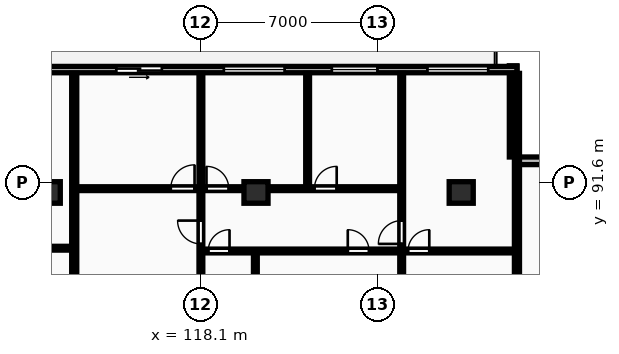
"""IFC4 building model, lengths in metres.
Left out: names, types, materials, properties, quantities, classifications, styles, units other than length and angle.
Written with IfcOpenShell. Run it as: python <this file> out.ifc"""

import sys

from ifc_helpers import new_model, si_unit, direction, frame, frame_2d, origin, origin_2d, place, context, subcontext, project, spatial, rectangle, extrude, element, fill, save


model = new_model("IFC4")
c1 = context("Model", 3, precision=1e-05, world=origin(), true_north=direction((0.0, 1.0)))
c2 = subcontext(c1, "Body", "Model", "MODEL_VIEW")
j1 = project(units=[si_unit("LENGTHUNIT", "METRE"), si_unit("PLANEANGLEUNIT", "RADIAN")], contexts=[c1])
p1 = place(None, origin())
s1 = spatial("IfcSite", under=j1, at=p1, CompositionType="ELEMENT")
p2 = place(p1, origin())
s2 = spatial("IfcBuilding", under=s1, at=p2, CompositionType="ELEMENT")
p3 = place(p2, frame((0.0, 0.0, 126.3)))
s3 = spatial("IfcBuildingStorey", under=s2, at=p3, CompositionType="ELEMENT", Elevation=126.3)
for number, where, z_axis, x_axis in (
    (1, (112.1, 91.2, 0.0), (0.0, 0.0, 1.0), (1.0, 0.0, 0.0)),
    (2, (120.3, 91.2, 0.0), (0.0, 0.0, 1.0), (1.0, 0.0, 0.0)),
    (3, (128.4, 91.2, 0.0), (0.0, 0.0, 1.0), (1.0, 0.0, 0.0)),
):
    element("IfcColumn", number, at=place(p3, frame(where, z_axis=z_axis, x_axis=x_axis)), inside=s3, PredefinedType="COLUMN", context=c2, shape_type="SweptSolid", body=[
        extrude(rectangle(XDim=0.95, YDim=0.85, at=origin_2d()), origin(), (0.0, 0.0, 1.0), 3.25),
    ])
for number, where, z_axis, x_axis in (
    (4, (134.2, 92.45, 0.0), (0.0, 0.0, 1.0), (-1.0, 0.0, 0.0)),
    (5, (130.45, 92.6, 0.0), (0.0, 0.0, 1.0), (0.0, 1.0, 0.0)),
):
    element("IfcWall", number, at=place(p3, frame(where, z_axis=z_axis, x_axis=x_axis)), inside=s3, PredefinedType="STANDARD", context=c2, shape_type="SweptSolid", body=[
        extrude(rectangle(XDim=3.6, YDim=0.3, at=frame_2d((1.8, 0.0))), origin(), (0.0, 0.0, 1.0), 2.97),
    ])
p4 = place(p3, frame((130.6, 96.05, 0.0), z_axis=(0.0, 0.0, 1.0), x_axis=(-1.0, 0.0, 0.0)))
e6 = element("IfcWall", 6, at=p4, inside=s3, PredefinedType="STANDARD", context=c2, shape_type="SweptSolid", body=[
    extrude(rectangle(XDim=73.0, YDim=0.25, at=frame_2d((36.5, 0.0))), origin(), (0.0, 0.0, 1.0), 2.97),
])
p5 = place(p4, frame((68.591, 0.0, 0.0)))
e7 = element("IfcOpeningElement", 7, at=p5, cuts=e6, PredefinedType="OPENING", context=c2, shape_type="SweptSolid", body=[
    extrude(rectangle(XDim=1.8, YDim=2.2, at=frame_2d((0.9, 1.1))), frame((0.0, 0.135, 0.0), z_axis=(0.0, -1.0, 0.0), x_axis=(1.0, 0.0, 0.0)), (0.0, 0.0, 1.0), 0.27),
])
p6 = place(p4, frame((60.092, 0.0, 0.85)))
e8 = element("IfcOpeningElement", 8, at=p6, cuts=e6, PredefinedType="OPENING", context=c2, shape_type="SweptSolid", body=[
    extrude(rectangle(XDim=2.4, YDim=1.9, at=frame_2d((1.2, 0.95))), frame((0.0, 0.135, 0.0), z_axis=(0.0, -1.0, 0.0), x_axis=(1.0, 0.0, 0.0)), (0.0, 0.0, 1.0), 0.27),
])
p7 = place(p4, frame((51.405, 0.0, 0.0)))
e9 = element("IfcOpeningElement", 9, at=p7, cuts=e6, PredefinedType="OPENING", context=c2, shape_type="SweptSolid", body=[
    extrude(rectangle(XDim=1.8, YDim=2.2, at=frame_2d((0.9, 1.1))), frame((0.0, 0.135, 0.0), z_axis=(0.0, -1.0, 0.0), x_axis=(1.0, 0.0, 0.0)), (0.0, 0.0, 1.0), 0.27),
])
p8 = place(p4, frame((41.925, 0.0, 0.85)))
e10 = element("IfcOpeningElement", 10, at=p8, cuts=e6, PredefinedType="OPENING", context=c2, shape_type="SweptSolid", body=[
    extrude(rectangle(XDim=2.4, YDim=1.9, at=frame_2d((1.2, 0.95))), frame((0.0, 0.135, 0.0), z_axis=(0.0, -1.0, 0.0), x_axis=(1.0, 0.0, 0.0)), (0.0, 0.0, 1.0), 0.27),
])
p9 = place(p4, frame((29.091, 0.0, 0.85)))
e11 = element("IfcOpeningElement", 11, at=p9, cuts=e6, PredefinedType="OPENING", context=c2, shape_type="SweptSolid", body=[
    extrude(rectangle(XDim=2.4, YDim=1.9, at=frame_2d((1.2, 0.95))), frame((0.0, 0.135, 0.0), z_axis=(0.0, -1.0, 0.0), x_axis=(1.0, 0.0, 0.0)), (0.0, 0.0, 1.0), 0.27),
])
p10 = place(p4, frame((23.727, 0.0, 0.85)))
e12 = element("IfcOpeningElement", 12, at=p10, cuts=e6, PredefinedType="OPENING", context=c2, shape_type="SweptSolid", body=[
    extrude(rectangle(XDim=2.4, YDim=1.9, at=frame_2d((1.2, 0.95))), frame((0.0, 0.135, 0.0), z_axis=(0.0, -1.0, 0.0), x_axis=(1.0, 0.0, 0.0)), (0.0, 0.0, 1.0), 0.27),
])
p11 = place(p4, frame((34.407, 0.0, 0.0)))
e13 = element("IfcOpeningElement", 13, at=p11, cuts=e6, PredefinedType="OPENING", context=c2, shape_type="SweptSolid", body=[
    extrude(rectangle(XDim=1.8, YDim=2.2, at=frame_2d((0.9, 1.1))), frame((0.0, 0.135, 0.0), z_axis=(0.0, -1.0, 0.0), x_axis=(1.0, 0.0, 0.0)), (0.0, 0.0, 1.0), 0.27),
])
p12 = place(p4, frame((18.72, 0.0, 0.85)))
e14 = element("IfcOpeningElement", 14, at=p12, cuts=e6, PredefinedType="OPENING", context=c2, shape_type="SweptSolid", body=[
    extrude(rectangle(XDim=2.4, YDim=1.9, at=frame_2d((1.2, 0.95))), frame((0.0, 0.135, 0.0), z_axis=(0.0, -1.0, 0.0), x_axis=(1.0, 0.0, 0.0)), (0.0, 0.0, 1.0), 0.27),
])
p13 = place(p4, frame((9.169, 0.0, 0.85)))
e15 = element("IfcOpeningElement", 15, at=p13, cuts=e6, PredefinedType="OPENING", context=c2, shape_type="SweptSolid", body=[
    extrude(rectangle(XDim=2.4, YDim=1.9, at=frame_2d((1.2, 0.95))), frame((0.0, 0.135, 0.0), z_axis=(0.0, -1.0, 0.0), x_axis=(1.0, 0.0, 0.0)), (0.0, 0.0, 1.0), 0.27),
])
p14 = place(p4, frame((5.506, 0.0, 0.85)))
e16 = element("IfcOpeningElement", 16, at=p14, cuts=e6, PredefinedType="OPENING", context=c2, shape_type="SweptSolid", body=[
    extrude(rectangle(XDim=1.8, YDim=1.8, at=frame_2d((0.9, 0.9))), frame((0.0, 0.135, 0.0), z_axis=(0.0, -1.0, 0.0), x_axis=(1.0, 0.0, 0.0)), (0.0, 0.0, 1.0), 0.27),
])
p15 = place(p4, frame((14.015, 0.0, 0.0)))
e17 = element("IfcOpeningElement", 17, at=p15, cuts=e6, PredefinedType="OPENING", context=c2, shape_type="SweptSolid", body=[
    extrude(rectangle(XDim=1.8, YDim=2.2, at=frame_2d((0.9, 1.1))), frame((0.0, 0.135, 0.0), z_axis=(0.0, -1.0, 0.0), x_axis=(1.0, 0.0, 0.0)), (0.0, 0.0, 1.0), 0.27),
])
p16 = place(p4, frame((1.135, 0.0, 0.85)))
e18 = element("IfcOpeningElement", 18, at=p16, cuts=e6, PredefinedType="OPENING", context=c2, shape_type="SweptSolid", body=[
    extrude(rectangle(XDim=2.4, YDim=1.9, at=frame_2d((1.2, 0.95))), frame((0.0, 0.135, 0.0), z_axis=(0.0, -1.0, 0.0), x_axis=(1.0, 0.0, 0.0)), (0.0, 0.0, 1.0), 0.27),
])
for number, where, z_axis, x_axis in (
    (19, (130.6, 69.83, 0.0), (0.0, 0.0, 1.0), (0.0, 1.0, 0.0)),
    (20, (113.125, 69.83, 0.0), (0.0, 0.0, 1.0), (0.0, 1.0, 0.0)),
):
    element("IfcWall", number, at=place(p3, frame(where, z_axis=z_axis, x_axis=x_axis)), inside=s3, PredefinedType="PARTITIONING", context=c2, shape_type="SweptSolid", body=[
        extrude(rectangle(XDim=26.07, YDim=0.2, at=frame_2d((13.035, 0.0))), origin(), (0.0, 0.0, 1.0), 2.97),
    ])
p17 = place(p3, frame((97.667, 89.0, 0.0), z_axis=(0.0, 0.0, 1.0), x_axis=(1.0, 0.0, 0.0)))
e21 = element("IfcWall", 21, at=p17, inside=s3, PredefinedType="PARTITIONING", context=c2, shape_type="SweptSolid", body=[
    extrude(rectangle(XDim=15.377, YDim=0.15, at=frame_2d((7.689, 0.0))), origin(), (0.0, 0.0, 1.0), 2.97),
])
p18 = place(p17, frame((1.191, 0.0, 0.0)))
e22 = element("IfcOpeningElement", 22, at=p18, cuts=e21, PredefinedType="OPENING", context=c2, shape_type="SweptSolid", body=[
    extrude(rectangle(XDim=0.84, YDim=2.04, at=frame_2d((0.42, 1.02))), frame((0.0, 0.085, 0.0), z_axis=(0.0, -1.0, 0.0), x_axis=(1.0, 0.0, 0.0)), (0.0, 0.0, 1.0), 0.17),
])
p19 = place(p17, frame((7.269, 0.0, 0.0)))
e23 = element("IfcOpeningElement", 23, at=p19, cuts=e21, PredefinedType="OPENING", context=c2, shape_type="SweptSolid", body=[
    extrude(rectangle(XDim=0.84, YDim=2.04, at=frame_2d((0.42, 1.02))), frame((0.0, 0.085, 0.0), z_axis=(0.0, -1.0, 0.0), x_axis=(1.0, 0.0, 0.0)), (0.0, 0.0, 1.0), 0.17),
])
p20 = place(p17, frame((10.938, 0.0, 0.0)))
e24 = element("IfcOpeningElement", 24, at=p20, cuts=e21, PredefinedType="OPENING", context=c2, shape_type="SweptSolid", body=[
    extrude(rectangle(XDim=0.84, YDim=2.04, at=frame_2d((0.42, 1.02))), frame((0.0, 0.085, 0.0), z_axis=(0.0, -1.0, 0.0), x_axis=(1.0, 0.0, 0.0)), (0.0, 0.0, 1.0), 0.17),
])
p21 = place(p3, frame((120.275, 86.29, 0.0), z_axis=(0.0, 0.0, 1.0), x_axis=(0.0, 1.0, 0.0)))
e25 = element("IfcWall", 25, at=p21, inside=s3, PredefinedType="PARTITIONING", context=c2, shape_type="SweptSolid", body=[
    extrude(rectangle(XDim=2.58, YDim=0.15, at=frame_2d((1.29, 0.0))), origin(), (0.0, 0.0, 1.0), 2.277),
])
p22 = place(p3, frame((122.337, 91.43, 0.0), z_axis=(0.0, 0.0, 1.0), x_axis=(0.0, 1.0, 0.0)))
e26 = element("IfcWall", 26, at=p22, inside=s3, PredefinedType="PARTITIONING", context=c2, shape_type="SweptSolid", body=[
    extrude(rectangle(XDim=4.47, YDim=0.15, at=frame_2d((2.235, 0.0))), origin(), (0.0, 0.0, 1.0), 2.97),
])
p23 = place(p3, frame((118.125, 86.29, 0.0), z_axis=(0.0, 0.0, 1.0), x_axis=(0.0, 1.0, 0.0)))
e27 = element("IfcWall", 27, at=p23, inside=s3, PredefinedType="PARTITIONING", context=c2, shape_type="SweptSolid", body=[
    extrude(rectangle(XDim=9.61, YDim=0.15, at=frame_2d((4.805, 0.0))), origin(), (0.0, 0.0, 1.0), 2.97),
])
p24 = place(p23, frame((2.88, 0.0, 0.0)))
e28 = element("IfcOpeningElement", 28, at=p24, cuts=e27, PredefinedType="OPENING", context=c2, shape_type="SweptSolid", body=[
    extrude(rectangle(XDim=0.92, YDim=2.08, at=frame_2d((0.46, 1.04))), frame((0.0, 0.085, 0.0), z_axis=(0.0, -1.0, 0.0), x_axis=(1.0, 0.0, 0.0)), (0.0, 0.0, 1.0), 0.17),
])
p25 = place(p3, frame((126.05, 86.29, 0.0), z_axis=(0.0, 0.0, 1.0), x_axis=(0.0, 1.0, 0.0)))
e29 = element("IfcWall", 29, at=p25, inside=s3, PredefinedType="PARTITIONING", context=c2, shape_type="SweptSolid", body=[
    extrude(rectangle(XDim=2.58, YDim=0.15, at=frame_2d((1.29, 0.0))), origin(), (0.0, 0.0, 1.0), 2.97),
])
p26 = place(p3, frame((126.05, 88.91, 0.0), z_axis=(0.0, 0.0, 1.0), x_axis=(0.0, 1.0, 0.0)))
e30 = element("IfcWall", 30, at=p26, inside=s3, PredefinedType="PARTITIONING", context=c2, shape_type="SweptSolid", body=[
    extrude(rectangle(XDim=6.99, YDim=0.15, at=frame_2d((3.495, 0.0))), origin(), (0.0, 0.0, 1.0), 2.97),
])
p27 = place(p26, frame((0.26, 0.0, 0.0)))
e31 = element("IfcOpeningElement", 31, at=p27, cuts=e30, PredefinedType="OPENING", context=c2, shape_type="SweptSolid", body=[
    extrude(rectangle(XDim=0.92, YDim=2.08, at=frame_2d((0.46, 1.04))), frame((0.0, 0.085, 0.0), z_axis=(0.0, -1.0, 0.0), x_axis=(1.0, 0.0, 0.0)), (0.0, 0.0, 1.0), 0.17),
])
p28 = place(p3, frame((118.165, 88.89, 0.0), z_axis=(0.0, 0.0, 1.0), x_axis=(1.0, 0.0, 0.0)))
e32 = element("IfcWall", 32, at=p28, inside=s3, PredefinedType="PARTITIONING", context=c2, shape_type="SweptSolid", body=[
    extrude(rectangle(XDim=12.355, YDim=0.15, at=frame_2d((6.177, 0.0))), origin(), (0.0, 0.0, 1.0), 2.97),
])
p29 = place(p28, frame((0.25, 0.0, 0.0)))
e33 = element("IfcOpeningElement", 33, at=p29, cuts=e32, PredefinedType="OPENING", context=c2, shape_type="SweptSolid", body=[
    extrude(rectangle(XDim=0.84, YDim=2.04, at=frame_2d((0.42, 1.02))), frame((0.0, 0.085, 0.0), z_axis=(0.0, -1.0, 0.0), x_axis=(1.0, 0.0, 0.0)), (0.0, 0.0, 1.0), 0.17),
])
p30 = place(p28, frame((5.758, 0.0, 0.0)))
e34 = element("IfcOpeningElement", 34, at=p30, cuts=e32, PredefinedType="OPENING", context=c2, shape_type="SweptSolid", body=[
    extrude(rectangle(XDim=0.84, YDim=2.04, at=frame_2d((0.42, 1.02))), frame((0.0, 0.085, 0.0), z_axis=(0.0, -1.0, 0.0), x_axis=(1.0, 0.0, 0.0)), (0.0, 0.0, 1.0), 0.17),
])
p31 = place(p28, frame((8.135, 0.0, 0.0)))
e35 = element("IfcOpeningElement", 35, at=p31, cuts=e32, PredefinedType="OPENING", context=c2, shape_type="SweptSolid", body=[
    extrude(rectangle(XDim=0.84, YDim=2.04, at=frame_2d((0.42, 1.02))), frame((0.0, 0.085, 0.0), z_axis=(0.0, -1.0, 0.0), x_axis=(1.0, 0.0, 0.0)), (0.0, 0.0, 1.0), 0.17),
])
p32 = place(p3, frame((113.205, 91.35, 0.0), z_axis=(0.0, 0.0, 1.0), x_axis=(1.0, 0.0, 0.0)))
e36 = element("IfcWall", 36, at=p32, inside=s3, PredefinedType="PARTITIONING", context=c2, shape_type="SweptSolid", body=[
    extrude(rectangle(XDim=12.845, YDim=0.15, at=frame_2d((6.422, 0.0))), origin(), (0.0, 0.0, 1.0), 2.663),
])
p33 = place(p32, frame((3.73, 0.0, 0.0)))
e37 = element("IfcOpeningElement", 37, at=p33, cuts=e36, PredefinedType="OPENING", context=c2, shape_type="SweptSolid", body=[
    extrude(rectangle(XDim=0.94, YDim=2.1, at=frame_2d((0.47, 1.05))), frame((0.0, 0.085, 0.0), z_axis=(0.0, -1.0, 0.0), x_axis=(1.0, 0.0, 0.0)), (0.0, 0.0, 1.0), 0.17),
])
p34 = place(p32, frame((5.14, 0.0, 0.0)))
e38 = element("IfcOpeningElement", 38, at=p34, cuts=e36, PredefinedType="OPENING", context=c2, shape_type="SweptSolid", body=[
    extrude(rectangle(XDim=0.88, YDim=2.06, at=frame_2d((0.44, 1.03))), frame((0.0, 0.085, 0.0), z_axis=(0.0, -1.0, 0.0), x_axis=(1.0, 0.0, 0.0)), (0.0, 0.0, 1.0), 0.17),
])
p35 = place(p32, frame((9.4, 0.0, 0.0)))
e39 = element("IfcOpeningElement", 39, at=p35, cuts=e36, PredefinedType="OPENING", context=c2, shape_type="SweptSolid", body=[
    extrude(rectangle(XDim=0.88, YDim=2.06, at=frame_2d((0.44, 1.03))), frame((0.0, 0.085, 0.0), z_axis=(0.0, -1.0, 0.0), x_axis=(1.0, 0.0, 0.0)), (0.0, 0.0, 1.0), 0.17),
])
p36 = place(p13, origin())
e40 = element("IfcWindow", 40, at=p36, inside=s3, PartitioningType="DOUBLE_PANEL_VERTICAL", PredefinedType="WINDOW", context=c2, shape_type="SweptSolid", body=[
    extrude(rectangle(XDim=2.4, YDim=1.9, at=frame_2d((1.2, 0.95))), frame((0.0, 0.03, 0.0), z_axis=(0.0, -1.0, 0.0), x_axis=(1.0, 0.0, 0.0)), (0.0, 0.0, 1.0), 0.06),
])
fill(e15, e40)
p37 = place(p14, origin())
e41 = element("IfcWindow", 41, at=p37, inside=s3, PartitioningType="SINGLE_PANEL", PredefinedType="WINDOW", context=c2, shape_type="SweptSolid", body=[
    extrude(rectangle(XDim=1.8, YDim=1.8, at=frame_2d((0.9, 0.9))), frame((0.0, 0.03, 0.0), z_axis=(0.0, -1.0, 0.0), x_axis=(1.0, 0.0, 0.0)), (0.0, 0.0, 1.0), 0.06),
])
fill(e16, e41)
p38 = place(p15, origin())
e42 = element("IfcDoor", 42, at=p38, inside=s3, OperationType="SLIDING_TO_LEFT", PredefinedType="DOOR", context=c2, shape_type="SweptSolid", body=[
    extrude(rectangle(XDim=1.8, YDim=2.2, at=frame_2d((0.9, 1.1))), frame((0.0, 0.025, 0.0), z_axis=(0.0, -1.0, 0.0), x_axis=(1.0, 0.0, 0.0)), (0.0, 0.0, 1.0), 0.05),
])
fill(e17, e42)
p39 = place(p16, origin())
e43 = element("IfcWindow", 43, at=p39, inside=s3, PartitioningType="DOUBLE_PANEL_VERTICAL", PredefinedType="WINDOW", context=c2, shape_type="SweptSolid", body=[
    extrude(rectangle(XDim=2.4, YDim=1.9, at=frame_2d((1.2, 0.95))), frame((0.0, 0.03, 0.0), z_axis=(0.0, -1.0, 0.0), x_axis=(1.0, 0.0, 0.0)), (0.0, 0.0, 1.0), 0.06),
])
fill(e18, e43)
p40 = place(p24, origin())
e44 = element("IfcDoor", 44, at=p40, inside=s3, OperationType="SINGLE_SWING_RIGHT", PredefinedType="DOOR", context=c2, shape_type="SweptSolid", body=[
    extrude(rectangle(XDim=0.92, YDim=2.08, at=frame_2d((0.46, 1.04))), frame((0.0, 0.025, 0.0), z_axis=(0.0, -1.0, 0.0), x_axis=(1.0, 0.0, 0.0)), (0.0, 0.0, 1.0), 0.05),
])
fill(e28, e44)
p41 = place(p27, origin())
e45 = element("IfcDoor", 45, at=p41, inside=s3, OperationType="SINGLE_SWING_LEFT", PredefinedType="DOOR", context=c2, shape_type="SweptSolid", body=[
    extrude(rectangle(XDim=0.92, YDim=2.08, at=frame_2d((0.46, 1.04))), frame((0.0, 0.025, 0.0), z_axis=(0.0, -1.0, 0.0), x_axis=(1.0, 0.0, 0.0)), (0.0, 0.0, 1.0), 0.05),
])
fill(e31, e45)
p42 = place(p29, origin())
e46 = element("IfcDoor", 46, at=p42, inside=s3, OperationType="SINGLE_SWING_RIGHT", PredefinedType="DOOR", context=c2, shape_type="SweptSolid", body=[
    extrude(rectangle(XDim=0.84, YDim=2.04, at=frame_2d((0.42, 1.02))), frame((0.0, 0.025, 0.0), z_axis=(0.0, -1.0, 0.0), x_axis=(1.0, 0.0, 0.0)), (0.0, 0.0, 1.0), 0.05),
])
fill(e33, e46)
p43 = place(p30, origin())
e47 = element("IfcDoor", 47, at=p43, inside=s3, OperationType="SINGLE_SWING_LEFT", PredefinedType="DOOR", context=c2, shape_type="SweptSolid", body=[
    extrude(rectangle(XDim=0.84, YDim=2.04, at=frame_2d((0.42, 1.02))), frame((0.0, 0.025, 0.0), z_axis=(0.0, -1.0, 0.0), x_axis=(1.0, 0.0, 0.0)), (0.0, 0.0, 1.0), 0.05),
])
fill(e34, e47)
p44 = place(p31, origin())
e48 = element("IfcDoor", 48, at=p44, inside=s3, OperationType="SINGLE_SWING_RIGHT", PredefinedType="DOOR", context=c2, shape_type="SweptSolid", body=[
    extrude(rectangle(XDim=0.84, YDim=2.04, at=frame_2d((0.42, 1.02))), frame((0.0, 0.025, 0.0), z_axis=(0.0, -1.0, 0.0), x_axis=(1.0, 0.0, 0.0)), (0.0, 0.0, 1.0), 0.05),
])
fill(e35, e48)
p45 = place(p33, origin())
e49 = element("IfcDoor", 49, at=p45, inside=s3, OperationType="SINGLE_SWING_RIGHT", PredefinedType="DOOR", context=c2, shape_type="SweptSolid", body=[
    extrude(rectangle(XDim=0.94, YDim=2.1, at=frame_2d((0.47, 1.05))), frame((0.0, 0.025, 0.0), z_axis=(0.0, -1.0, 0.0), x_axis=(1.0, 0.0, 0.0)), (0.0, 0.0, 1.0), 0.05),
])
fill(e37, e49)
p46 = place(p34, origin())
e50 = element("IfcDoor", 50, at=p46, inside=s3, OperationType="SINGLE_SWING_LEFT", PredefinedType="DOOR", context=c2, shape_type="SweptSolid", body=[
    extrude(rectangle(XDim=0.88, YDim=2.06, at=frame_2d((0.44, 1.03))), frame((0.0, 0.025, 0.0), z_axis=(0.0, -1.0, 0.0), x_axis=(1.0, 0.0, 0.0)), (0.0, 0.0, 1.0), 0.05),
])
fill(e38, e50)
p47 = place(p35, origin())
e51 = element("IfcDoor", 51, at=p47, inside=s3, OperationType="SINGLE_SWING_RIGHT", PredefinedType="DOOR", context=c2, shape_type="SweptSolid", body=[
    extrude(rectangle(XDim=0.88, YDim=2.06, at=frame_2d((0.44, 1.03))), frame((0.0, 0.025, 0.0), z_axis=(0.0, -1.0, 0.0), x_axis=(1.0, 0.0, 0.0)), (0.0, 0.0, 1.0), 0.05),
])
fill(e39, e51)
save(model, sys.argv[1])
